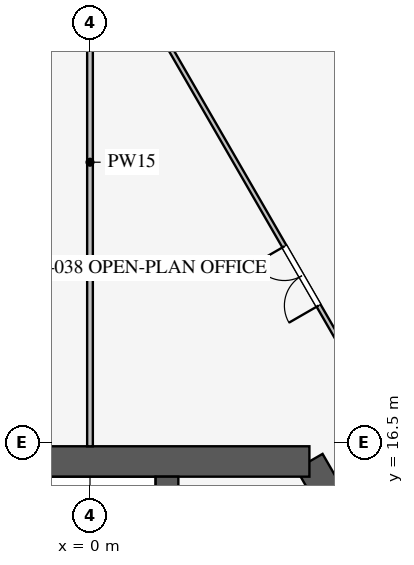
"""IFC4 building model, lengths in metres.
Left out: names, types, materials, properties, quantities, classifications, styles, units other than length and angle.
Written with IfcOpenShell. Run it as: python <this file> out.ifc"""

import sys

from ifc_helpers import new_model, si_unit, direction, frame, frame_2d, origin, place, context, subcontext, project, spatial, rectangle, extrude, element, fill, save


model = new_model("IFC4")
c1 = context("Model", 3, precision=1e-05, world=origin(), true_north=direction((0.0, 1.0)))
c2 = subcontext(c1, "Body", "Model", "MODEL_VIEW")
j1 = project(units=[si_unit("LENGTHUNIT", "METRE"), si_unit("PLANEANGLEUNIT", "RADIAN")], contexts=[c1])
p1 = place(None, origin())
s1 = spatial("IfcSite", under=j1, at=p1, CompositionType="ELEMENT")
p2 = place(p1, origin())
s2 = spatial("IfcBuilding", under=s1, at=p2, CompositionType="ELEMENT")
p3 = place(p2, frame((0.0, 0.0, 189.7)))
s3 = spatial("IfcBuildingStorey", under=s2, at=p3, CompositionType="ELEMENT", Elevation=189.7)
p4 = place(p3, frame((16.743, -3.0, 0.0), z_axis=(0.0, 0.0, 1.0), x_axis=(-0.500002442456, 0.866023993627, 0.0)))
e1 = element("IfcWall", 1, at=p4, inside=s3, PredefinedType="SHEAR", context=c2, shape_type="SweptSolid", body=[
    extrude(rectangle(XDim=21.939, YDim=0.8, at=frame_2d((10.97, 0.0))), origin(), (0.0, 0.0, 1.0), 4.2),
])
p5 = place(p4, frame((17.27, 0.0, 0.0)))
e2 = element("IfcOpeningElement", 2, at=p5, cuts=e1, PredefinedType="OPENING", context=c2, shape_type="SweptSolid", body=[
    extrude(rectangle(XDim=1.2, YDim=2.1, at=frame_2d((0.6, 1.05))), frame((0.0, 0.41, 0.0), z_axis=(0.0, -1.0, 0.0), x_axis=(1.0, 0.0, 0.0)), (0.0, 0.0, 1.0), 0.82),
])
p6 = place(p4, frame((3.47, 0.0, 0.0)))
e3 = element("IfcOpeningElement", 3, at=p6, cuts=e1, PredefinedType="OPENING", context=c2, shape_type="SweptSolid", body=[
    extrude(rectangle(XDim=1.2, YDim=2.1, at=frame_2d((0.6, 1.05))), frame((0.0, 0.41, 0.0), z_axis=(0.0, -1.0, 0.0), x_axis=(1.0, 0.0, 0.0)), (0.0, 0.0, 1.0), 0.82),
])
p7 = place(p3, frame((5.773, 16.0, 0.0), z_axis=(0.0, 0.0, 1.0), x_axis=(-1.0, 0.0, 0.0)))
e4 = element("IfcWall", 4, at=p7, inside=s3, PredefinedType="SHEAR", context=c2, shape_type="SweptSolid", body=[
    extrude(rectangle(XDim=11.547, YDim=0.8, at=frame_2d((5.773, 0.0))), origin(), (0.0, 0.0, 1.0), 4.2),
])
p8 = place(p3, frame((2.025, 6.525, 0.0), z_axis=(0.0, 0.0, 1.0), x_axis=(0.0, 1.0, 0.0)))
e5 = element("IfcWall", 5, at=p8, inside=s3, PredefinedType="SHEAR", context=c2, shape_type="SweptSolid", body=[
    extrude(rectangle(XDim=9.075, YDim=0.6, at=frame_2d((4.538, 0.0))), origin(), (0.0, 0.0, 1.0), 4.2),
])
p9 = place(p3, frame((0.0, 16.4, 0.0), z_axis=(0.0, 0.0, 1.0), x_axis=(0.0, 1.0, 0.0)))
e6 = element("IfcWall", 6, at=p9, inside=s3, PredefinedType="PARTITIONING", context=c2, shape_type="SweptSolid", body=[
    extrude(rectangle(XDim=14.95, YDim=0.15, at=frame_2d((7.475, 0.0))), origin(), (0.0, 0.0, 1.0), 2.4),
])
p10 = place(p3, frame((26.415, -15.231, 0.0), z_axis=(0.0, 0.0, 1.0), x_axis=(-0.50000091641, 0.866024874695, 0.0)))
e7 = element("IfcWall", 7, at=p10, inside=s3, PredefinedType="PARTITIONING", context=c2, shape_type="SweptSolid", body=[
    extrude(rectangle(XDim=52.796, YDim=0.12, at=frame_2d((26.398, 0.0))), origin(), (0.0, 0.0, 1.0), 2.9),
])
p11 = place(p10, frame((10.2, 0.0, 0.15)))
e8 = element("IfcOpeningElement", 8, at=p11, cuts=e7, PredefinedType="OPENING", context=c2, shape_type="SweptSolid", body=[
    extrude(rectangle(XDim=1.8, YDim=2.1, at=frame_2d((0.9, 1.05))), frame((0.0, 0.07, 0.0), z_axis=(0.0, -1.0, 0.0), x_axis=(1.0, 0.0, 0.0)), (0.0, 0.0, 1.0), 0.14),
])
p12 = place(p10, frame((40.8, 0.0, 0.15)))
e9 = element("IfcOpeningElement", 9, at=p12, cuts=e7, PredefinedType="OPENING", context=c2, shape_type="SweptSolid", body=[
    extrude(rectangle(XDim=1.8, YDim=2.1, at=frame_2d((0.9, 1.05))), frame((0.0, 0.07, 0.0), z_axis=(0.0, -1.0, 0.0), x_axis=(1.0, 0.0, 0.0)), (0.0, 0.0, 1.0), 0.14),
])
p13 = place(p3, frame((-0.016, 30.491, 0.0), z_axis=(0.0, 0.0, 1.0), x_axis=(-0.50000091641, -0.866024874695, 0.0)))
e10 = element("IfcWall", 10, at=p13, inside=s3, PredefinedType="PARTITIONING", context=c2, shape_type="SweptSolid", body=[
    extrude(rectangle(XDim=52.796, YDim=0.12, at=frame_2d((26.398, 0.0))), origin(), (0.0, 0.0, 1.0), 2.9),
])
p14 = place(p13, frame((10.2, 0.0, 0.15)))
e11 = element("IfcOpeningElement", 11, at=p14, cuts=e10, PredefinedType="OPENING", context=c2, shape_type="SweptSolid", body=[
    extrude(rectangle(XDim=1.8, YDim=2.1, at=frame_2d((0.9, 1.05))), frame((0.0, 0.07, 0.0), z_axis=(0.0, -1.0, 0.0), x_axis=(1.0, 0.0, 0.0)), (0.0, 0.0, 1.0), 0.14),
])
p15 = place(p13, frame((40.8, 0.0, 0.15)))
e12 = element("IfcOpeningElement", 12, at=p15, cuts=e10, PredefinedType="OPENING", context=c2, shape_type="SweptSolid", body=[
    extrude(rectangle(XDim=1.8, YDim=2.1, at=frame_2d((0.9, 1.05))), frame((0.0, 0.07, 0.0), z_axis=(0.0, -1.0, 0.0), x_axis=(1.0, 0.0, 0.0)), (0.0, 0.0, 1.0), 0.14),
])
p16 = place(p12, origin())
e13 = element("IfcDoor", 13, at=p16, inside=s3, OperationType="DOUBLE_DOOR_SINGLE_SWING", PredefinedType="DOOR", context=c2, shape_type="SweptSolid", body=[
    extrude(rectangle(XDim=1.8, YDim=2.1, at=frame_2d((0.9, 1.05))), frame((0.0, 0.025, 0.0), z_axis=(0.0, -1.0, 0.0), x_axis=(1.0, 0.0, 0.0)), (0.0, 0.0, 1.0), 0.05),
])
fill(e9, e13)
save(model, sys.argv[1])
